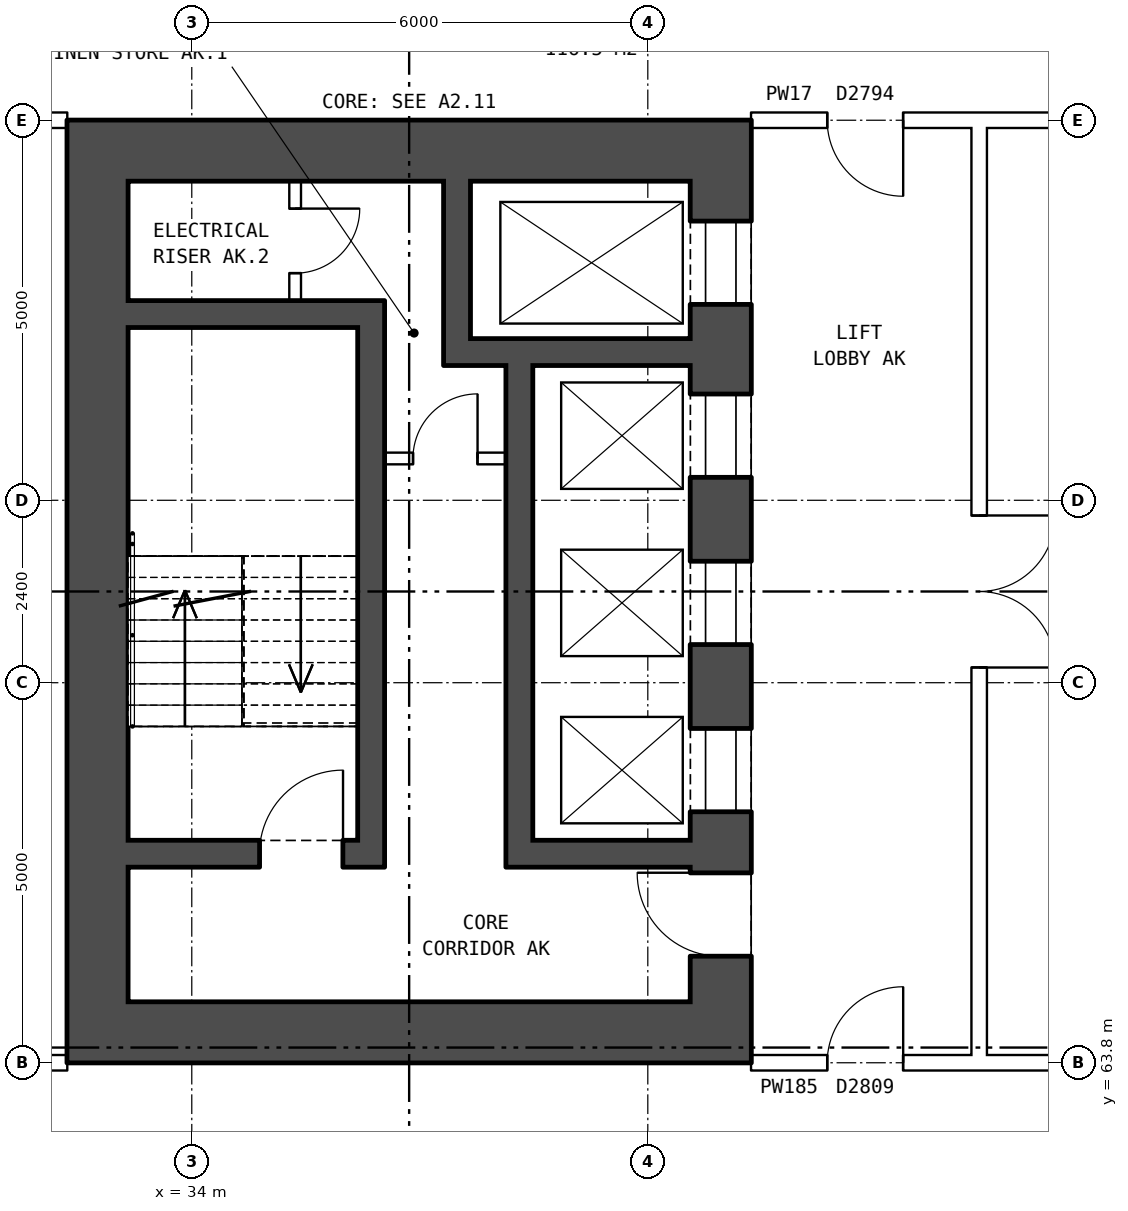
"""IFC4 building model, lengths in metres.
Left out: names, types, materials, properties, quantities, classifications, styles, units other than length and angle.
Written with IfcOpenShell. Run it as: python <this file> out.ifc"""

import sys

from ifc_helpers import new_model, si_unit, direction, frame, frame_2d, origin, place, context, subcontext, project, spatial, rectangle, extrude, element, fill, save


model = new_model("IFC4")
c1 = context("Model", 3, precision=1e-05, world=origin(), true_north=direction((0.0, 1.0)))
c2 = subcontext(c1, "Body", "Model", "MODEL_VIEW")
j1 = project(units=[si_unit("LENGTHUNIT", "METRE"), si_unit("PLANEANGLEUNIT", "RADIAN")], contexts=[c1])
p1 = place(None, origin())
s1 = spatial("IfcSite", under=j1, at=p1, CompositionType="ELEMENT")
p2 = place(p1, origin())
s2 = spatial("IfcBuilding", under=s1, at=p2, CompositionType="ELEMENT")
p3 = place(p2, frame((0.0, 0.0, 38.1)))
s3 = spatial("IfcBuildingStorey", under=s2, at=p3, CompositionType="ELEMENT", Elevation=38.1)
p4 = place(p3, frame((40.96, 75.4, 0.0), z_axis=(0.0, 0.0, 1.0), x_axis=(0.0, -1.0, 0.0)))
e1 = element("IfcWall", 1, at=p4, inside=s3, PredefinedType="SHEAR", context=c2, shape_type="SweptSolid", body=[
    extrude(rectangle(XDim=10.8, YDim=0.8, at=frame_2d((5.4, 0.0))), origin(), (0.0, 0.0, 1.0), 5.6),
])
p5 = place(p4, frame((0.525, 0.0, 0.0)))
e2 = element("IfcOpeningElement", 2, at=p5, cuts=e1, PredefinedType="OPENING", context=c2, shape_type="SweptSolid", body=[
    extrude(rectangle(XDim=1.1, YDim=2.1, at=frame_2d((0.55, 1.05))), frame((0.0, 0.41, 0.0), z_axis=(0.0, -1.0, 0.0), x_axis=(1.0, 0.0, 0.0)), (0.0, 0.0, 1.0), 0.82),
])
p6 = place(p4, frame((2.8, 0.0, 0.0)))
e3 = element("IfcOpeningElement", 3, at=p6, cuts=e1, PredefinedType="OPENING", context=c2, shape_type="SweptSolid", body=[
    extrude(rectangle(XDim=1.1, YDim=2.1, at=frame_2d((0.55, 1.05))), frame((0.0, 0.41, 0.0), z_axis=(0.0, -1.0, 0.0), x_axis=(1.0, 0.0, 0.0)), (0.0, 0.0, 1.0), 0.82),
])
p7 = place(p4, frame((5.0, 0.0, 0.0)))
e4 = element("IfcOpeningElement", 4, at=p7, cuts=e1, PredefinedType="OPENING", context=c2, shape_type="SweptSolid", body=[
    extrude(rectangle(XDim=1.1, YDim=2.1, at=frame_2d((0.55, 1.05))), frame((0.0, 0.41, 0.0), z_axis=(0.0, -1.0, 0.0), x_axis=(1.0, 0.0, 0.0)), (0.0, 0.0, 1.0), 0.82),
])
p8 = place(p4, frame((7.2, 0.0, 0.0)))
e5 = element("IfcOpeningElement", 5, at=p8, cuts=e1, PredefinedType="OPENING", context=c2, shape_type="SweptSolid", body=[
    extrude(rectangle(XDim=1.1, YDim=2.1, at=frame_2d((0.55, 1.05))), frame((0.0, 0.41, 0.0), z_axis=(0.0, -1.0, 0.0), x_axis=(1.0, 0.0, 0.0)), (0.0, 0.0, 1.0), 0.82),
])
p9 = place(p4, frame((9.1, 0.0, 0.0)))
e6 = element("IfcOpeningElement", 6, at=p9, cuts=e1, PredefinedType="OPENING", context=c2, shape_type="SweptSolid", body=[
    extrude(rectangle(XDim=1.1, YDim=2.1, at=frame_2d((0.55, 1.05))), frame((0.0, 0.41, 0.0), z_axis=(0.0, -1.0, 0.0), x_axis=(1.0, 0.0, 0.0)), (0.0, 0.0, 1.0), 0.82),
])
p10 = place(p3, frame((32.76, 75.4, 0.0), z_axis=(0.0, 0.0, 1.0), x_axis=(0.0, -1.0, 0.0)))
e7 = element("IfcWall", 7, at=p10, inside=s3, PredefinedType="SHEAR", context=c2, shape_type="SweptSolid", body=[
    extrude(rectangle(XDim=10.8, YDim=0.8, at=frame_2d((5.4, 0.0))), origin(), (0.0, 0.0, 1.0), 5.6),
])
for number, where, z_axis, x_axis in (
    (8, (41.36, 75.8, 0.0), (0.0, 0.0, 1.0), (-1.0, 0.0, 0.0)),
    (9, (41.36, 64.2, 0.0), (0.0, 0.0, 1.0), (-1.0, 0.0, 0.0)),
):
    element("IfcWall", number, at=place(p3, frame(where, z_axis=z_axis, x_axis=x_axis)), inside=s3, PredefinedType="SHEAR", context=c2, shape_type="SweptSolid", body=[
        extrude(rectangle(XDim=9.0, YDim=0.8, at=frame_2d((4.5, 0.0))), origin(), (0.0, 0.0, 1.0), 5.6),
    ])
p11 = place(p3, frame((36.185, 73.65, 0.0), z_axis=(0.0, 0.0, 1.0), x_axis=(-1.0, 0.0, 0.0)))
e10 = element("IfcWall", 10, at=p11, inside=s3, PredefinedType="SHEAR", context=c2, shape_type="SweptSolid", body=[
    extrude(rectangle(XDim=3.025, YDim=0.35, at=frame_2d((1.513, 0.0))), origin(), (0.0, 0.0, 1.0), 5.6),
])
p12 = place(p3, frame((40.56, 73.15, 0.0), z_axis=(0.0, 0.0, 1.0), x_axis=(-1.0, 0.0, 0.0)))
e11 = element("IfcWall", 11, at=p12, inside=s3, PredefinedType="SHEAR", context=c2, shape_type="SweptSolid", body=[
    extrude(rectangle(XDim=3.245, YDim=0.35, at=frame_2d((1.623, 0.0))), origin(), (0.0, 0.0, 1.0), 5.6),
])
p13 = place(p3, frame((38.135, 71.75, 0.0), z_axis=(0.0, 0.0, 1.0), x_axis=(-1.0, 0.0, 0.0)))
e12 = element("IfcWall", 12, at=p13, inside=s3, PredefinedType="PARTITIONING", context=c2, shape_type="SweptSolid", body=[
    extrude(rectangle(XDim=1.6, YDim=0.15, at=frame_2d((0.8, 0.0))), origin(), (0.0, 0.0, 1.0), 5.6),
])
p14 = place(p13, frame((0.375, 0.0, 0.0)))
e13 = element("IfcOpeningElement", 13, at=p14, cuts=e12, PredefinedType="OPENING", context=c2, shape_type="SweptSolid", body=[
    extrude(rectangle(XDim=0.85, YDim=2.1, at=frame_2d((0.425, 1.05))), frame((0.0, 0.085, 0.0), z_axis=(0.0, -1.0, 0.0), x_axis=(1.0, 0.0, 0.0)), (0.0, 0.0, 1.0), 0.17),
])
p15 = place(p3, frame((40.56, 66.55, 0.0), z_axis=(0.0, 0.0, 1.0), x_axis=(-1.0, 0.0, 0.0)))
e14 = element("IfcWall", 14, at=p15, inside=s3, PredefinedType="SHEAR", context=c2, shape_type="SweptSolid", body=[
    extrude(rectangle(XDim=2.075, YDim=0.35, at=frame_2d((1.038, 0.0))), origin(), (0.0, 0.0, 1.0), 5.6),
])
p16 = place(p3, frame((36.185, 66.55, 0.0), z_axis=(0.0, 0.0, 1.0), x_axis=(-1.0, 0.0, 0.0)))
e15 = element("IfcWall", 15, at=p16, inside=s3, PredefinedType="SHEAR", context=c2, shape_type="SweptSolid", body=[
    extrude(rectangle(XDim=3.025, YDim=0.35, at=frame_2d((1.513, 0.0))), origin(), (0.0, 0.0, 1.0), 5.6),
])
p17 = place(p16, frame((0.195, 0.0, 0.0)))
e16 = element("IfcOpeningElement", 16, at=p17, cuts=e15, PredefinedType="OPENING", context=c2, shape_type="SweptSolid", body=[
    extrude(rectangle(XDim=1.1, YDim=2.1, at=frame_2d((0.55, 1.05))), frame((0.0, 0.185, 0.0), z_axis=(0.0, -1.0, 0.0), x_axis=(1.0, 0.0, 0.0)), (0.0, 0.0, 1.0), 0.37),
])
p18 = place(p3, frame((38.31, 72.975, 0.0), z_axis=(0.0, 0.0, 1.0), x_axis=(0.0, -1.0, 0.0)))
e17 = element("IfcWall", 17, at=p18, inside=s3, PredefinedType="SHEAR", context=c2, shape_type="SweptSolid", body=[
    extrude(rectangle(XDim=6.6, YDim=0.35, at=frame_2d((3.3, 0.0))), origin(), (0.0, 0.0, 1.0), 5.6),
])
p19 = place(p3, frame((37.49, 75.4, 0.0), z_axis=(0.0, 0.0, 1.0), x_axis=(0.0, -1.0, 0.0)))
e18 = element("IfcWall", 18, at=p19, inside=s3, PredefinedType="SHEAR", context=c2, shape_type="SweptSolid", body=[
    extrude(rectangle(XDim=2.075, YDim=0.35, at=frame_2d((1.038, 0.0))), origin(), (0.0, 0.0, 1.0), 5.6),
])
p20 = place(p3, frame((36.36, 73.825, 0.0), z_axis=(0.0, 0.0, 1.0), x_axis=(0.0, -1.0, 0.0)))
e19 = element("IfcWall", 19, at=p20, inside=s3, PredefinedType="SHEAR", context=c2, shape_type="SweptSolid", body=[
    extrude(rectangle(XDim=7.45, YDim=0.35, at=frame_2d((3.725, 0.0))), origin(), (0.0, 0.0, 1.0), 5.6),
])
p21 = place(p3, frame((35.36, 75.4, 0.0), z_axis=(0.0, 0.0, 1.0), x_axis=(0.0, -1.0, 0.0)))
e20 = element("IfcWall", 20, at=p21, inside=s3, PredefinedType="PARTITIONING", context=c2, shape_type="SweptSolid", body=[
    extrude(rectangle(XDim=1.575, YDim=0.15, at=frame_2d((0.788, 0.0))), origin(), (0.0, 0.0, 1.0), 5.6),
])
p22 = place(p21, frame((0.363, 0.0, 0.0)))
e21 = element("IfcOpeningElement", 21, at=p22, cuts=e20, PredefinedType="OPENING", context=c2, shape_type="SweptSolid", body=[
    extrude(rectangle(XDim=0.85, YDim=2.1, at=frame_2d((0.425, 1.05))), frame((0.0, 0.085, 0.0), z_axis=(0.0, -1.0, 0.0), x_axis=(1.0, 0.0, 0.0)), (0.0, 0.0, 1.0), 0.17),
])
p23 = place(p3, frame((44.36, 63.9, 0.0), z_axis=(0.0, 0.0, 1.0), x_axis=(0.0, 1.0, 0.0)))
e22 = element("IfcWall", 22, at=p23, inside=s3, PredefinedType="PARTITIONING", context=c2, shape_type="SweptSolid", body=[
    extrude(rectangle(XDim=12.2, YDim=0.2, at=frame_2d((6.1, 0.0))), origin(), (0.0, 0.0, 1.0), 5.6),
])
p24 = place(p23, frame((5.1, 0.0, 0.0)))
e23 = element("IfcOpeningElement", 23, at=p24, cuts=e22, PredefinedType="OPENING", context=c2, shape_type="SweptSolid", body=[
    extrude(rectangle(XDim=2.0, YDim=2.1, at=frame_2d((1.0, 1.05))), frame((0.0, 0.11, 0.0), z_axis=(0.0, -1.0, 0.0), x_axis=(1.0, 0.0, 0.0)), (0.0, 0.0, 1.0), 0.22),
])
p25 = place(p3, frame((24.9, 63.8, 0.0), z_axis=(0.0, 0.0, 1.0), x_axis=(1.0, 0.0, 0.0)))
e24 = element("IfcWall", 24, at=p25, inside=s3, PredefinedType="PARTITIONING", context=c2, shape_type="SweptSolid", body=[
    extrude(rectangle(XDim=7.46, YDim=0.2, at=frame_2d((3.73, 0.0))), origin(), (0.0, 0.0, 1.0), 5.6),
])
p26 = place(p25, frame((3.03, 0.0, 0.0)))
e25 = element("IfcOpeningElement", 25, at=p26, cuts=e24, PredefinedType="OPENING", context=c2, shape_type="SweptSolid", body=[
    extrude(rectangle(XDim=1.8, YDim=2.1, at=frame_2d((0.9, 1.05))), frame((0.0, 0.11, 0.0), z_axis=(0.0, -1.0, 0.0), x_axis=(1.0, 0.0, 0.0)), (0.0, 0.0, 1.0), 0.22),
])
p27 = place(p3, frame((44.36, 63.8, 0.0), z_axis=(0.0, 0.0, 1.0), x_axis=(1.0, 0.0, 0.0)))
e26 = element("IfcWall", 26, at=p27, inside=s3, PredefinedType="PARTITIONING", context=c2, shape_type="SweptSolid", body=[
    extrude(rectangle(XDim=19.28, YDim=0.2, at=frame_2d((9.64, 0.0))), origin(), (0.0, 0.0, 1.0), 5.6),
])
p28 = place(p27, frame((8.74, 0.0, 0.0)))
e27 = element("IfcOpeningElement", 27, at=p28, cuts=e26, PredefinedType="OPENING", context=c2, shape_type="SweptSolid", body=[
    extrude(rectangle(XDim=1.8, YDim=2.1, at=frame_2d((0.9, 1.05))), frame((0.0, 0.11, 0.0), z_axis=(0.0, -1.0, 0.0), x_axis=(1.0, 0.0, 0.0)), (0.0, 0.0, 1.0), 0.22),
])
p29 = place(p3, frame((41.36, 63.8, 0.0), z_axis=(0.0, 0.0, 1.0), x_axis=(1.0, 0.0, 0.0)))
e28 = element("IfcWall", 28, at=p29, inside=s3, PredefinedType="PARTITIONING", context=c2, shape_type="SweptSolid", body=[
    extrude(rectangle(XDim=3.0, YDim=0.2, at=frame_2d((1.5, 0.0))), origin(), (0.0, 0.0, 1.0), 5.6),
])
p30 = place(p29, frame((1.0, 0.0, 0.0)))
e29 = element("IfcOpeningElement", 29, at=p30, cuts=e28, PredefinedType="OPENING", context=c2, shape_type="SweptSolid", body=[
    extrude(rectangle(XDim=1.0, YDim=2.1, at=frame_2d((0.5, 1.05))), frame((0.0, 0.11, 0.0), z_axis=(0.0, -1.0, 0.0), x_axis=(1.0, 0.0, 0.0)), (0.0, 0.0, 1.0), 0.22),
])
p31 = place(p3, frame((24.9, 76.2, 0.0), z_axis=(0.0, 0.0, 1.0), x_axis=(1.0, 0.0, 0.0)))
e30 = element("IfcWall", 30, at=p31, inside=s3, PredefinedType="PARTITIONING", context=c2, shape_type="SweptSolid", body=[
    extrude(rectangle(XDim=7.46, YDim=0.2, at=frame_2d((3.73, 0.0))), origin(), (0.0, 0.0, 1.0), 5.6),
])
p32 = place(p31, frame((3.03, 0.0, 0.0)))
e31 = element("IfcOpeningElement", 31, at=p32, cuts=e30, PredefinedType="OPENING", context=c2, shape_type="SweptSolid", body=[
    extrude(rectangle(XDim=1.8, YDim=2.1, at=frame_2d((0.9, 1.05))), frame((0.0, 0.11, 0.0), z_axis=(0.0, -1.0, 0.0), x_axis=(1.0, 0.0, 0.0)), (0.0, 0.0, 1.0), 0.22),
])
p33 = place(p3, frame((44.36, 76.2, 0.0), z_axis=(0.0, 0.0, 1.0), x_axis=(1.0, 0.0, 0.0)))
e32 = element("IfcWall", 32, at=p33, inside=s3, PredefinedType="PARTITIONING", context=c2, shape_type="SweptSolid", body=[
    extrude(rectangle(XDim=19.28, YDim=0.2, at=frame_2d((9.64, 0.0))), origin(), (0.0, 0.0, 1.0), 5.6),
])
p34 = place(p33, frame((8.74, 0.0, 0.0)))
e33 = element("IfcOpeningElement", 33, at=p34, cuts=e32, PredefinedType="OPENING", context=c2, shape_type="SweptSolid", body=[
    extrude(rectangle(XDim=1.8, YDim=2.1, at=frame_2d((0.9, 1.05))), frame((0.0, 0.11, 0.0), z_axis=(0.0, -1.0, 0.0), x_axis=(1.0, 0.0, 0.0)), (0.0, 0.0, 1.0), 0.22),
])
p35 = place(p3, frame((41.36, 76.2, 0.0), z_axis=(0.0, 0.0, 1.0), x_axis=(1.0, 0.0, 0.0)))
e34 = element("IfcWall", 34, at=p35, inside=s3, PredefinedType="PARTITIONING", context=c2, shape_type="SweptSolid", body=[
    extrude(rectangle(XDim=3.0, YDim=0.2, at=frame_2d((1.5, 0.0))), origin(), (0.0, 0.0, 1.0), 5.6),
])
p36 = place(p35, frame((1.0, 0.0, 0.0)))
e35 = element("IfcOpeningElement", 35, at=p36, cuts=e34, PredefinedType="OPENING", context=c2, shape_type="SweptSolid", body=[
    extrude(rectangle(XDim=1.0, YDim=2.1, at=frame_2d((0.5, 1.05))), frame((0.0, 0.11, 0.0), z_axis=(0.0, -1.0, 0.0), x_axis=(1.0, 0.0, 0.0)), (0.0, 0.0, 1.0), 0.22),
])
p37 = place(p5, origin())
e36 = element("IfcDoor", 36, at=p37, inside=s3, OperationType="DOUBLE_DOOR_SLIDING", PredefinedType="DOOR", context=c2, shape_type="SweptSolid", body=[
    extrude(rectangle(XDim=1.1, YDim=2.1, at=frame_2d((0.55, 1.05))), frame((0.0, -0.335, 0.0), z_axis=(0.0, -1.0, 0.0), x_axis=(1.0, 0.0, 0.0)), (0.0, 0.0, 1.0), 0.05),
])
fill(e2, e36)
p38 = place(p6, origin())
e37 = element("IfcDoor", 37, at=p38, inside=s3, OperationType="DOUBLE_DOOR_SLIDING", PredefinedType="DOOR", context=c2, shape_type="SweptSolid", body=[
    extrude(rectangle(XDim=1.1, YDim=2.1, at=frame_2d((0.55, 1.05))), frame((0.0, -0.335, 0.0), z_axis=(0.0, -1.0, 0.0), x_axis=(1.0, 0.0, 0.0)), (0.0, 0.0, 1.0), 0.05),
])
fill(e3, e37)
p39 = place(p7, origin())
e38 = element("IfcDoor", 38, at=p39, inside=s3, OperationType="DOUBLE_DOOR_SLIDING", PredefinedType="DOOR", context=c2, shape_type="SweptSolid", body=[
    extrude(rectangle(XDim=1.1, YDim=2.1, at=frame_2d((0.55, 1.05))), frame((0.0, -0.335, 0.0), z_axis=(0.0, -1.0, 0.0), x_axis=(1.0, 0.0, 0.0)), (0.0, 0.0, 1.0), 0.05),
])
fill(e4, e38)
p40 = place(p8, origin())
e39 = element("IfcDoor", 39, at=p40, inside=s3, OperationType="DOUBLE_DOOR_SLIDING", PredefinedType="DOOR", context=c2, shape_type="SweptSolid", body=[
    extrude(rectangle(XDim=1.1, YDim=2.1, at=frame_2d((0.55, 1.05))), frame((0.0, -0.335, 0.0), z_axis=(0.0, -1.0, 0.0), x_axis=(1.0, 0.0, 0.0)), (0.0, 0.0, 1.0), 0.05),
])
fill(e5, e39)
p41 = place(p9, frame((1.1, 0.0, 0.0), z_axis=(0.0, 0.0, 1.0), x_axis=(-1.0, 0.0, 0.0)))
e40 = element("IfcDoor", 40, at=p41, inside=s3, OperationType="SINGLE_SWING_RIGHT", PredefinedType="DOOR", context=c2, shape_type="SweptSolid", body=[
    extrude(rectangle(XDim=1.1, YDim=2.1, at=frame_2d((0.55, 1.05))), frame((0.0, 0.385, 0.0), z_axis=(0.0, -1.0, 0.0), x_axis=(1.0, 0.0, 0.0)), (0.0, 0.0, 1.0), 0.05),
])
fill(e6, e40)
p42 = place(p17, frame((1.1, 0.0, 0.0), z_axis=(0.0, 0.0, 1.0), x_axis=(-1.0, 0.0, 0.0)))
e41 = element("IfcDoor", 41, at=p42, inside=s3, OperationType="SINGLE_SWING_RIGHT", PredefinedType="DOOR", context=c2, shape_type="SweptSolid", body=[
    extrude(rectangle(XDim=1.1, YDim=2.1, at=frame_2d((0.55, 1.05))), frame((0.0, 0.025, 0.0), z_axis=(0.0, -1.0, 0.0), x_axis=(1.0, 0.0, 0.0)), (0.0, 0.0, 1.0), 0.05),
])
fill(e16, e41)
p43 = place(p14, frame((0.85, 0.0, 0.0), z_axis=(0.0, 0.0, 1.0), x_axis=(-1.0, 0.0, 0.0)))
e42 = element("IfcDoor", 42, at=p43, inside=s3, OperationType="SINGLE_SWING_RIGHT", PredefinedType="DOOR", context=c2, shape_type="SweptSolid", body=[
    extrude(rectangle(XDim=0.85, YDim=2.1, at=frame_2d((0.425, 1.05))), frame((0.0, 0.025, 0.0), z_axis=(0.0, -1.0, 0.0), x_axis=(1.0, 0.0, 0.0)), (0.0, 0.0, 1.0), 0.05),
])
fill(e13, e42)
p44 = place(p22, origin())
e43 = element("IfcDoor", 43, at=p44, inside=s3, OperationType="SINGLE_SWING_LEFT", PredefinedType="DOOR", context=c2, shape_type="SweptSolid", body=[
    extrude(rectangle(XDim=0.85, YDim=2.1, at=frame_2d((0.425, 1.05))), frame((0.0, 0.025, 0.0), z_axis=(0.0, -1.0, 0.0), x_axis=(1.0, 0.0, 0.0)), (0.0, 0.0, 1.0), 0.05),
])
fill(e21, e43)
p45 = place(p24, frame((2.0, 0.0, 0.0), z_axis=(0.0, 0.0, 1.0), x_axis=(-1.0, 0.0, 0.0)))
e44 = element("IfcDoor", 44, at=p45, inside=s3, OperationType="DOUBLE_DOOR_SINGLE_SWING", PredefinedType="DOOR", context=c2, shape_type="SweptSolid", body=[
    extrude(rectangle(XDim=2.0, YDim=2.1, at=frame_2d((1.0, 1.05))), frame((0.0, 0.025, 0.0), z_axis=(0.0, -1.0, 0.0), x_axis=(1.0, 0.0, 0.0)), (0.0, 0.0, 1.0), 0.05),
])
fill(e23, e44)
p46 = place(p30, origin())
e45 = element("IfcDoor", 45, at=p46, inside=s3, OperationType="SINGLE_SWING_RIGHT", PredefinedType="DOOR", context=c2, shape_type="SweptSolid", body=[
    extrude(rectangle(XDim=1.0, YDim=2.1, at=frame_2d((0.5, 1.05))), frame((0.0, 0.025, 0.0), z_axis=(0.0, -1.0, 0.0), x_axis=(1.0, 0.0, 0.0)), (0.0, 0.0, 1.0), 0.05),
])
fill(e29, e45)
p47 = place(p36, frame((1.0, 0.0, 0.0), z_axis=(0.0, 0.0, 1.0), x_axis=(-1.0, 0.0, 0.0)))
e46 = element("IfcDoor", 46, at=p47, inside=s3, OperationType="SINGLE_SWING_LEFT", PredefinedType="DOOR", context=c2, shape_type="SweptSolid", body=[
    extrude(rectangle(XDim=1.0, YDim=2.1, at=frame_2d((0.5, 1.05))), frame((0.0, 0.025, 0.0), z_axis=(0.0, -1.0, 0.0), x_axis=(1.0, 0.0, 0.0)), (0.0, 0.0, 1.0), 0.05),
])
fill(e35, e46)
save(model, sys.argv[1])
